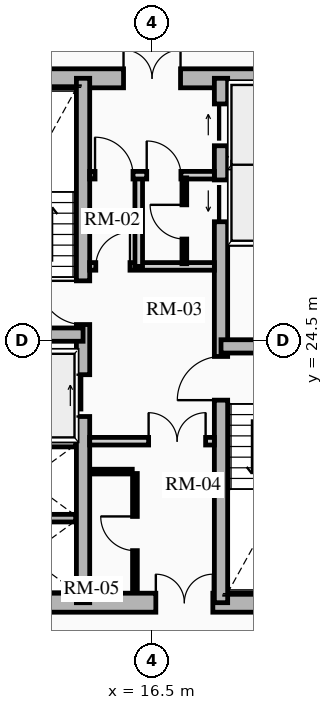
"""IFC4 building model, lengths in metres.
Left out: names, types, materials, properties, quantities, classifications, styles, units other than length and angle.
Written with IfcOpenShell. Run it as: python <this file> out.ifc"""

import sys

from ifc_helpers import new_model, si_unit, direction, frame, frame_2d, origin, place, context, subcontext, project, spatial, rectangle, extrude, source, transform, mapped, element, fill, save


model = new_model("IFC4")
c1 = context("Model", 3, precision=1e-05, world=origin(), true_north=direction((0.0, 1.0)))
c2 = subcontext(c1, "Body", "Model", "MODEL_VIEW")
j1 = project(units=[si_unit("LENGTHUNIT", "METRE"), si_unit("PLANEANGLEUNIT", "RADIAN")], contexts=[c1])
p1 = place(None, origin())
s1 = spatial("IfcSite", under=j1, at=p1, CompositionType="ELEMENT")
p2 = place(p1, origin())
s2 = spatial("IfcBuilding", under=s1, at=p2, CompositionType="ELEMENT")
p3 = place(p2, frame((0.0, 0.0, 27.82)))
s3 = spatial("IfcBuildingStorey", under=s2, at=p3, CompositionType="ELEMENT", Elevation=27.82)
p4 = place(p3, frame((11.15, 17.6, 0.0), z_axis=(0.0, 0.0, 1.0), x_axis=(1.0, 0.0, 0.0)))
e1 = element("IfcWall", 1, at=p4, inside=s3, PredefinedType="SHEAR", context=c2, shape_type="SweptSolid", body=[
    extrude(rectangle(XDim=10.7, YDim=0.5, at=frame_2d((5.35, 0.0))), origin(), (0.0, 0.0, 1.0), 2.91),
])
m1 = source(origin(), c2, "Body", "SweptSolid", [
    extrude(rectangle(XDim=1.5, YDim=2.02, at=frame_2d((0.75, 1.01))), frame((0.0, 0.26, 0.0), z_axis=(0.0, -1.0, 0.0), x_axis=(1.0, 0.0, 0.0)), (0.0, 0.0, 1.0), 0.52),
])
p5 = place(p4, frame((5.45, 0.0, 0.0)))
e2 = element("IfcOpeningElement", 2, at=p5, cuts=e1, PredefinedType="OPENING", context=c2, shape_type="MappedRepresentation", body=[
    mapped(m1, transform((0.0, 0.0, 0.0), x_axis=(1.0, 0.0, 0.0), y_axis=(0.0, 1.0, 0.0), z_axis=(0.0, 0.0, 1.0), scale=1.0)),
])
p6 = place(p3, frame((11.15, 31.4, 0.0), z_axis=(0.0, 0.0, 1.0), x_axis=(1.0, 0.0, 0.0)))
e3 = element("IfcWall", 3, at=p6, inside=s3, PredefinedType="SHEAR", context=c2, shape_type="SweptSolid", body=[
    extrude(rectangle(XDim=10.7, YDim=0.5, at=frame_2d((5.35, 0.0))), origin(), (0.0, 0.0, 1.0), 2.91),
])
p7 = place(p6, frame((4.6, 0.0, 0.0)))
e4 = element("IfcOpeningElement", 4, at=p7, cuts=e3, PredefinedType="OPENING", context=c2, shape_type="MappedRepresentation", body=[
    mapped(m1, transform((0.0, 0.0, 0.0), x_axis=(1.0, 0.0, 0.0), y_axis=(0.0, 1.0, 0.0), z_axis=(0.0, 0.0, 1.0), scale=1.0)),
])
p8 = place(p3, frame((14.685, 17.6, 0.0), z_axis=(0.0, 0.0, 1.0), x_axis=(0.0, 1.0, 0.0)))
e5 = element("IfcWall", 5, at=p8, inside=s3, PredefinedType="SHEAR", context=c2, shape_type="SweptSolid", body=[
    extrude(rectangle(XDim=13.8, YDim=0.35, at=frame_2d((6.9, 0.0))), origin(), (0.0, 0.0, 1.0), 2.91),
])
m2 = source(origin(), c2, "Body", "SweptSolid", [
    extrude(rectangle(XDim=1.1, YDim=2.015, at=frame_2d((0.55, 1.007))), frame((0.0, 0.185, 0.0), z_axis=(0.0, -1.0, 0.0), x_axis=(1.0, 0.0, 0.0)), (0.0, 0.0, 1.0), 0.37),
])
p9 = place(p8, frame((4.9, 0.0, 0.0)))
e6 = element("IfcOpeningElement", 6, at=p9, cuts=e5, PredefinedType="OPENING", context=c2, shape_type="MappedRepresentation", body=[
    mapped(m2, transform((0.0, 0.0, 0.0), x_axis=(1.0, 0.0, 0.0), y_axis=(0.0, 1.0, 0.0), z_axis=(0.0, 0.0, 1.0), scale=1.0)),
])
m3 = source(origin(), c2, "Body", "SweptSolid", [
    extrude(rectangle(XDim=1.15, YDim=2.02, at=frame_2d((0.575, 1.01))), frame((0.0, 0.185, 0.0), z_axis=(0.0, -1.0, 0.0), x_axis=(1.0, 0.0, 0.0)), (0.0, 0.0, 1.0), 0.37),
])
p10 = place(p8, frame((7.32, 0.0, 0.0)))
e7 = element("IfcOpeningElement", 7, at=p10, cuts=e5, PredefinedType="OPENING", context=c2, shape_type="MappedRepresentation", body=[
    mapped(m3, transform((0.0, 0.0, 0.0), x_axis=(1.0, 0.0, 0.0), y_axis=(0.0, 1.0, 0.0), z_axis=(0.0, 0.0, 1.0), scale=1.0)),
])
p11 = place(p3, frame((18.315, 17.6, 0.0), z_axis=(0.0, 0.0, 1.0), x_axis=(0.0, 1.0, 0.0)))
e8 = element("IfcWall", 8, at=p11, inside=s3, PredefinedType="SHEAR", context=c2, shape_type="SweptSolid", body=[
    extrude(rectangle(XDim=13.8, YDim=0.35, at=frame_2d((6.9, 0.0))), origin(), (0.0, 0.0, 1.0), 2.91),
])
p12 = place(p11, frame((10.025, 0.0, 0.0)))
e9 = element("IfcOpeningElement", 9, at=p12, cuts=e8, PredefinedType="OPENING", context=c2, shape_type="MappedRepresentation", body=[
    mapped(m2, transform((0.0, 0.0, 0.0), x_axis=(1.0, 0.0, 0.0), y_axis=(0.0, 1.0, 0.0), z_axis=(0.0, 0.0, 1.0), scale=1.0)),
])
p13 = place(p11, frame((12.025, 0.0, 0.0)))
e10 = element("IfcOpeningElement", 10, at=p13, cuts=e8, PredefinedType="OPENING", context=c2, shape_type="MappedRepresentation", body=[
    mapped(m2, transform((0.0, 0.0, 0.0), x_axis=(1.0, 0.0, 0.0), y_axis=(0.0, 1.0, 0.0), z_axis=(0.0, 0.0, 1.0), scale=1.0)),
])
p14 = place(p11, frame((5.33, 0.0, 0.0)))
e11 = element("IfcOpeningElement", 11, at=p14, cuts=e8, PredefinedType="OPENING", context=c2, shape_type="MappedRepresentation", body=[
    mapped(m3, transform((0.0, 0.0, 0.0), x_axis=(1.0, 0.0, 0.0), y_axis=(0.0, 1.0, 0.0), z_axis=(0.0, 0.0, 1.0), scale=1.0)),
])
for number, where, z_axis, x_axis in (
    (12, (11.4, 24.655, 0.0), (0.0, 0.0, 1.0), (1.0, 0.0, 0.0)),
    (13, (18.315, 24.345, 0.0), (0.0, 0.0, 1.0), (1.0, 0.0, 0.0)),
):
    element("IfcWall", number, at=place(p3, frame(where, z_axis=z_axis, x_axis=x_axis)), inside=s3, PredefinedType="SHEAR", context=c2, shape_type="SweptSolid", body=[
        extrude(rectangle(XDim=3.285, YDim=0.35, at=frame_2d((1.643, 0.0))), origin(), (0.0, 0.0, 1.0), 2.91),
    ])
for number, where, z_axis, x_axis in (
    (14, (11.52, 21.8, 0.0), (0.0, 0.0, 1.0), (1.0, 0.0, 0.0)),
    (15, (11.52, 19.825, 0.0), (0.0, 0.0, 1.0), (1.0, 0.0, 0.0)),
    (16, (18.51, 27.13, 0.0), (0.0, 0.0, 1.0), (1.0, 0.0, 0.0)),
    (17, (18.51, 29.175, 0.0), (0.0, 0.0, 1.0), (1.0, 0.0, 0.0)),
):
    element("IfcWall", number, at=place(p3, frame(where, z_axis=z_axis, x_axis=x_axis)), inside=s3, PredefinedType="SHEAR", context=c2, shape_type="SweptSolid", body=[
        extrude(rectangle(XDim=2.97, YDim=0.2, at=frame_2d((1.485, 0.0))), origin(), (0.0, 0.0, 1.0), 2.91),
    ])
p15 = place(p3, frame((14.86, 21.85, 0.0), z_axis=(0.0, 0.0, 1.0), x_axis=(1.0, 0.0, 0.0)))
e18 = element("IfcWall", 18, at=p15, inside=s3, PredefinedType="PARTITIONING", context=c2, shape_type="SweptSolid", body=[
    extrude(rectangle(XDim=3.28, YDim=0.2, at=frame_2d((1.64, 0.0))), origin(), (0.0, 0.0, 1.0), 2.635),
])
m4 = source(origin(), c2, "Body", "SweptSolid", [
    extrude(rectangle(XDim=1.5, YDim=2.02, at=frame_2d((0.75, 1.01))), frame((0.0, 0.11, 0.0), z_axis=(0.0, -1.0, 0.0), x_axis=(1.0, 0.0, 0.0)), (0.0, 0.0, 1.0), 0.22),
])
p16 = place(p15, frame((1.55, 0.0, 0.0)))
e19 = element("IfcOpeningElement", 19, at=p16, cuts=e18, PredefinedType="OPENING", context=c2, shape_type="MappedRepresentation", body=[
    mapped(m4, transform((0.0, 0.0, 0.0), x_axis=(1.0, 0.0, 0.0), y_axis=(0.0, 1.0, 0.0), z_axis=(0.0, 0.0, 1.0), scale=1.0)),
])
p17 = place(p3, frame((14.86, 26.45, 0.0), z_axis=(0.0, 0.0, 1.0), x_axis=(1.0, 0.0, 0.0)))
e20 = element("IfcWall", 20, at=p17, inside=s3, PredefinedType="PARTITIONING", context=c2, shape_type="SweptSolid", body=[
    extrude(rectangle(XDim=3.28, YDim=0.2, at=frame_2d((1.64, 0.0))), origin(), (0.0, 0.0, 1.0), 2.635),
])
m5 = source(origin(), c2, "Body", "SweptSolid", [
    extrude(rectangle(XDim=0.9, YDim=2.005, at=frame_2d((0.45, 1.002))), frame((0.0, 0.11, 0.0), z_axis=(0.0, -1.0, 0.0), x_axis=(1.0, 0.0, 0.0)), (0.0, 0.0, 1.0), 0.22),
])
p18 = place(p17, frame((0.16, 0.0, 0.0)))
e21 = element("IfcOpeningElement", 21, at=p18, cuts=e20, PredefinedType="OPENING", context=c2, shape_type="MappedRepresentation", body=[
    mapped(m5, transform((0.0, 0.0, 0.0), x_axis=(1.0, 0.0, 0.0), y_axis=(0.0, 1.0, 0.0), z_axis=(0.0, 0.0, 1.0), scale=1.0)),
])
p19 = place(p3, frame((16.15, 26.45, 0.0), z_axis=(0.0, 0.0, 1.0), x_axis=(0.0, 1.0, 0.0)))
e22 = element("IfcWall", 22, at=p19, inside=s3, PredefinedType="PARTITIONING", context=c2, shape_type="SweptSolid", body=[
    extrude(rectangle(XDim=2.4, YDim=0.2, at=frame_2d((1.2, 0.0))), origin(), (0.0, 0.0, 1.0), 2.635),
])
p20 = place(p3, frame((14.86, 28.85, 0.0), z_axis=(0.0, 0.0, 1.0), x_axis=(1.0, 0.0, 0.0)))
e23 = element("IfcWall", 23, at=p20, inside=s3, PredefinedType="PARTITIONING", context=c2, shape_type="SweptSolid", body=[
    extrude(rectangle(XDim=3.28, YDim=0.2, at=frame_2d((1.64, 0.0))), origin(), (0.0, 0.0, 1.0), 2.635),
])
m6 = source(origin(), c2, "Body", "SweptSolid", [
    extrude(rectangle(XDim=1.0, YDim=2.015, at=frame_2d((0.5, 1.007))), frame((0.0, 0.11, 0.0), z_axis=(0.0, -1.0, 0.0), x_axis=(1.0, 0.0, 0.0)), (0.0, 0.0, 1.0), 0.22),
])
p21 = place(p20, frame((0.14, 0.0, 0.0)))
e24 = element("IfcOpeningElement", 24, at=p21, cuts=e23, PredefinedType="OPENING", context=c2, shape_type="MappedRepresentation", body=[
    mapped(m6, transform((0.0, 0.0, 0.0), x_axis=(1.0, 0.0, 0.0), y_axis=(0.0, 1.0, 0.0), z_axis=(0.0, 0.0, 1.0), scale=1.0)),
])
p22 = place(p20, frame((1.5, 0.0, 0.0)))
e25 = element("IfcOpeningElement", 25, at=p22, cuts=e23, PredefinedType="OPENING", context=c2, shape_type="MappedRepresentation", body=[
    mapped(m5, transform((0.0, 0.0, 0.0), x_axis=(1.0, 0.0, 0.0), y_axis=(0.0, 1.0, 0.0), z_axis=(0.0, 0.0, 1.0), scale=1.0)),
])
p23 = place(p3, frame((16.05, 17.92, 0.0), z_axis=(0.0, 0.0, 1.0), x_axis=(0.0, 1.0, 0.0)))
e26 = element("IfcWall", 26, at=p23, inside=s3, PredefinedType="PARTITIONING", context=c2, shape_type="SweptSolid", body=[
    extrude(rectangle(XDim=3.08, YDim=0.125, at=frame_2d((1.54, 0.0))), origin(), (0.0, 0.0, 1.0), 2.635),
])
m7 = source(origin(), c2, "Body", "SweptSolid", [
    extrude(rectangle(XDim=0.9, YDim=2.005, at=frame_2d((0.45, 1.002))), frame((0.0, 0.073, 0.0), z_axis=(0.0, -1.0, 0.0), x_axis=(1.0, 0.0, 0.0)), (0.0, 0.0, 1.0), 0.145),
])
p24 = place(p23, frame((1.05, 0.0, 0.0)))
e27 = element("IfcOpeningElement", 27, at=p24, cuts=e26, PredefinedType="OPENING", context=c2, shape_type="MappedRepresentation", body=[
    mapped(m7, transform((0.0, 0.0, 0.0), x_axis=(1.0, 0.0, 0.0), y_axis=(0.0, 1.0, 0.0), z_axis=(0.0, 0.0, 1.0), scale=1.0)),
])
p25 = place(p3, frame((14.88, 21.05, 0.0), z_axis=(0.0, 0.0, 1.0), x_axis=(1.0, 0.0, 0.0)))
e28 = element("IfcWall", 28, at=p25, inside=s3, PredefinedType="PARTITIONING", context=c2, shape_type="SweptSolid", body=[
    extrude(rectangle(XDim=1.1, YDim=0.125, at=frame_2d((0.55, 0.0))), origin(), (0.0, 0.0, 1.0), 2.635),
])
p26 = place(p3, frame((17.35, 26.52, 0.0), z_axis=(0.0, 0.0, 1.0), x_axis=(0.0, 1.0, 0.0)))
e29 = element("IfcWall", 29, at=p26, inside=s3, PredefinedType="PARTITIONING", context=c2, shape_type="SweptSolid", body=[
    extrude(rectangle(XDim=2.26, YDim=0.125, at=frame_2d((1.13, 0.0))), origin(), (0.0, 0.0, 1.0), 2.635),
])
p27 = place(p26, frame((0.65, 0.0, 0.0)))
e30 = element("IfcOpeningElement", 30, at=p27, cuts=e29, PredefinedType="OPENING", context=c2, shape_type="MappedRepresentation", body=[
    mapped(m7, transform((0.0, 0.0, 0.0), x_axis=(1.0, 0.0, 0.0), y_axis=(0.0, 1.0, 0.0), z_axis=(0.0, 0.0, 1.0), scale=1.0)),
])
m8 = source(origin(), c2, "Body", "SweptSolid", [
    extrude(rectangle(XDim=1.1, YDim=2.015, at=frame_2d((0.55, 1.007))), frame((0.0, 0.025, 0.0), z_axis=(0.0, -1.0, 0.0), x_axis=(1.0, 0.0, 0.0)), (0.0, 0.0, 1.0), 0.05),
])
p28 = place(p9, origin())
e31 = element("IfcDoor", 31, at=p28, inside=s3, OperationType="SLIDING_TO_RIGHT", PredefinedType="DOOR", context=c2, shape_type="MappedRepresentation", body=[
    mapped(m8, transform((0.0, 0.0, 0.0), x_axis=(1.0, 0.0, 0.0), y_axis=(0.0, 1.0, 0.0), z_axis=(0.0, 0.0, 1.0), scale=1.0)),
])
fill(e6, e31)
p29 = place(p12, origin())
e32 = element("IfcDoor", 32, at=p29, inside=s3, OperationType="SLIDING_TO_LEFT", PredefinedType="DOOR", context=c2, shape_type="MappedRepresentation", body=[
    mapped(m8, transform((0.0, 0.0, 0.0), x_axis=(1.0, 0.0, 0.0), y_axis=(0.0, 1.0, 0.0), z_axis=(0.0, 0.0, 1.0), scale=1.0)),
])
fill(e9, e32)
p30 = place(p13, origin())
e33 = element("IfcDoor", 33, at=p30, inside=s3, OperationType="SLIDING_TO_RIGHT", PredefinedType="DOOR", context=c2, shape_type="MappedRepresentation", body=[
    mapped(m8, transform((0.0, 0.0, 0.0), x_axis=(1.0, 0.0, 0.0), y_axis=(0.0, 1.0, 0.0), z_axis=(0.0, 0.0, 1.0), scale=1.0)),
])
fill(e10, e33)
m9 = source(origin(), c2, "Body", "SweptSolid", [
    extrude(rectangle(XDim=1.15, YDim=2.02, at=frame_2d((0.575, 1.01))), frame((0.0, 0.025, 0.0), z_axis=(0.0, -1.0, 0.0), x_axis=(1.0, 0.0, 0.0)), (0.0, 0.0, 1.0), 0.05),
])
p31 = place(p10, origin())
e34 = element("IfcDoor", 34, at=p31, inside=s3, OperationType="SINGLE_SWING_RIGHT", PredefinedType="DOOR", context=c2, shape_type="MappedRepresentation", body=[
    mapped(m9, transform((0.0, 0.0, 0.0), x_axis=(1.0, 0.0, 0.0), y_axis=(0.0, 1.0, 0.0), z_axis=(0.0, 0.0, 1.0), scale=1.0)),
])
fill(e7, e34)
p32 = place(p14, origin())
e35 = element("IfcDoor", 35, at=p32, inside=s3, OperationType="SINGLE_SWING_LEFT", PredefinedType="DOOR", context=c2, shape_type="MappedRepresentation", body=[
    mapped(m9, transform((0.0, 0.0, 0.0), x_axis=(1.0, 0.0, 0.0), y_axis=(0.0, 1.0, 0.0), z_axis=(0.0, 0.0, 1.0), scale=1.0)),
])
fill(e11, e35)
m10 = source(origin(), c2, "Body", "SweptSolid", [
    extrude(rectangle(XDim=1.5, YDim=2.02, at=frame_2d((0.75, 1.01))), frame((0.0, 0.025, 0.0), z_axis=(0.0, -1.0, 0.0), x_axis=(1.0, 0.0, 0.0)), (0.0, 0.0, 1.0), 0.05),
])
p33 = place(p7, origin())
e36 = element("IfcDoor", 36, at=p33, inside=s3, OperationType="DOUBLE_DOOR_SINGLE_SWING", PredefinedType="DOOR", context=c2, shape_type="MappedRepresentation", body=[
    mapped(m10, transform((0.0, 0.0, 0.0), x_axis=(1.0, 0.0, 0.0), y_axis=(0.0, 1.0, 0.0), z_axis=(0.0, 0.0, 1.0), scale=1.0)),
])
fill(e4, e36)
p34 = place(p5, origin())
e37 = element("IfcDoor", 37, at=p34, inside=s3, OperationType="DOUBLE_DOOR_SINGLE_SWING", PredefinedType="DOOR", context=c2, shape_type="MappedRepresentation", body=[
    mapped(m10, transform((0.0, 0.0, 0.0), x_axis=(1.0, 0.0, 0.0), y_axis=(0.0, 1.0, 0.0), z_axis=(0.0, 0.0, 1.0), scale=1.0)),
])
fill(e2, e37)
p35 = place(p16, origin())
e38 = element("IfcDoor", 38, at=p35, inside=s3, OperationType="DOUBLE_DOOR_SINGLE_SWING", PredefinedType="DOOR", context=c2, shape_type="MappedRepresentation", body=[
    mapped(m10, transform((0.0, 0.0, 0.0), x_axis=(1.0, 0.0, 0.0), y_axis=(0.0, 1.0, 0.0), z_axis=(0.0, 0.0, 1.0), scale=1.0)),
])
fill(e19, e38)
m11 = source(origin(), c2, "Body", "SweptSolid", [
    extrude(rectangle(XDim=0.9, YDim=2.005, at=frame_2d((0.45, 1.002))), frame((0.0, 0.025, 0.0), z_axis=(0.0, -1.0, 0.0), x_axis=(1.0, 0.0, 0.0)), (0.0, 0.0, 1.0), 0.05),
])
p36 = place(p18, origin())
e39 = element("IfcDoor", 39, at=p36, inside=s3, OperationType="SINGLE_SWING_RIGHT", PredefinedType="DOOR", context=c2, shape_type="MappedRepresentation", body=[
    mapped(m11, transform((0.0, 0.0, 0.0), x_axis=(1.0, 0.0, 0.0), y_axis=(0.0, 1.0, 0.0), z_axis=(0.0, 0.0, 1.0), scale=1.0)),
])
fill(e21, e39)
m12 = source(origin(), c2, "Body", "SweptSolid", [
    extrude(rectangle(XDim=1.0, YDim=2.015, at=frame_2d((0.5, 1.007))), frame((0.0, 0.025, 0.0), z_axis=(0.0, -1.0, 0.0), x_axis=(1.0, 0.0, 0.0)), (0.0, 0.0, 1.0), 0.05),
])
p37 = place(p21, origin())
e40 = element("IfcDoor", 40, at=p37, inside=s3, OperationType="SINGLE_SWING_LEFT", PredefinedType="DOOR", context=c2, shape_type="MappedRepresentation", body=[
    mapped(m12, transform((0.0, 0.0, 0.0), x_axis=(1.0, 0.0, 0.0), y_axis=(0.0, 1.0, 0.0), z_axis=(0.0, 0.0, 1.0), scale=1.0)),
])
fill(e24, e40)
p38 = place(p24, origin())
e41 = element("IfcDoor", 41, at=p38, inside=s3, OperationType="SINGLE_SWING_RIGHT", PredefinedType="DOOR", context=c2, shape_type="MappedRepresentation", body=[
    mapped(m11, transform((0.0, 0.0, 0.0), x_axis=(1.0, 0.0, 0.0), y_axis=(0.0, 1.0, 0.0), z_axis=(0.0, 0.0, 1.0), scale=1.0)),
])
fill(e27, e41)
p39 = place(p22, origin())
e42 = element("IfcDoor", 42, at=p39, inside=s3, OperationType="SINGLE_SWING_LEFT", PredefinedType="DOOR", context=c2, shape_type="MappedRepresentation", body=[
    mapped(m11, transform((0.0, 0.0, 0.0), x_axis=(1.0, 0.0, 0.0), y_axis=(0.0, 1.0, 0.0), z_axis=(0.0, 0.0, 1.0), scale=1.0)),
])
fill(e25, e42)
p40 = place(p27, origin())
e43 = element("IfcDoor", 43, at=p40, inside=s3, OperationType="SINGLE_SWING_RIGHT", PredefinedType="DOOR", context=c2, shape_type="MappedRepresentation", body=[
    mapped(m11, transform((0.0, 0.0, 0.0), x_axis=(1.0, 0.0, 0.0), y_axis=(0.0, 1.0, 0.0), z_axis=(0.0, 0.0, 1.0), scale=1.0)),
])
fill(e30, e43)
save(model, sys.argv[1])
